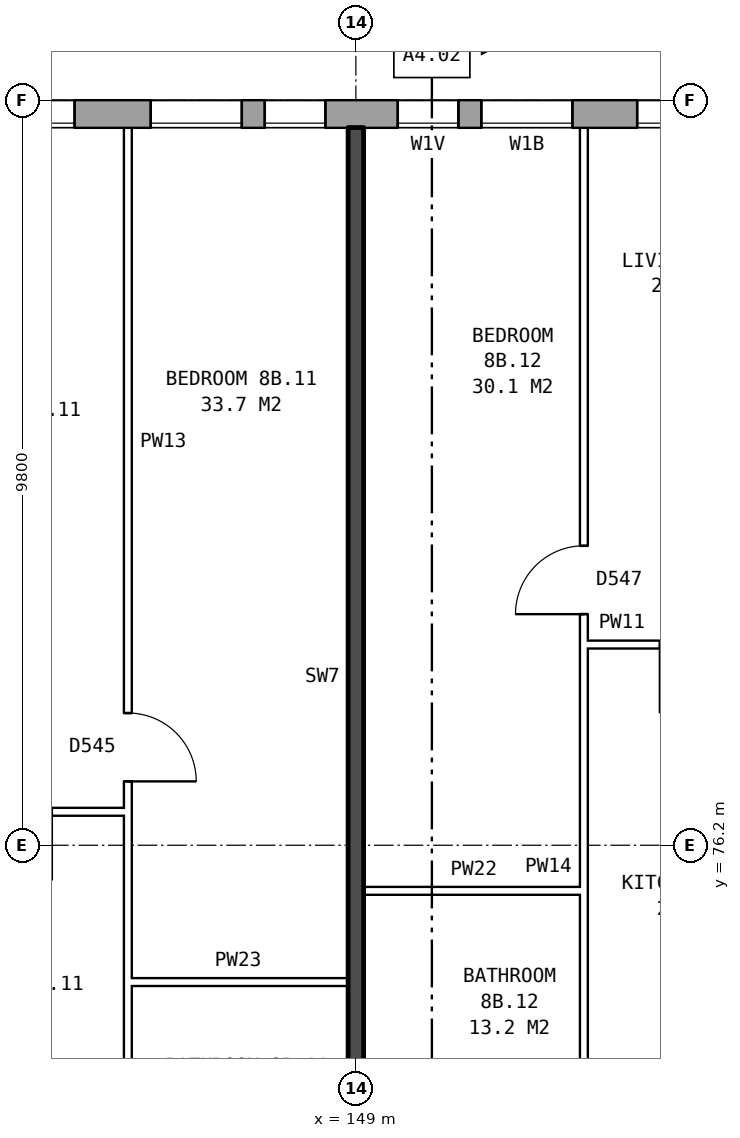
"""IFC4 building model, lengths in metres.
Left out: names, types, materials, properties, quantities, classifications, styles, units other than length and angle.
Written with IfcOpenShell. Run it as: python <this file> out.ifc"""

import sys

from ifc_helpers import new_model, si_unit, direction, frame, frame_2d, origin, place, context, subcontext, project, spatial, rectangle, extrude, element, fill, save


model = new_model("IFC4")
c1 = context("Model", 3, precision=1e-05, world=origin(), true_north=direction((0.0, 1.0)))
c2 = subcontext(c1, "Body", "Model", "MODEL_VIEW")
j1 = project(units=[si_unit("LENGTHUNIT", "METRE"), si_unit("PLANEANGLEUNIT", "RADIAN")], contexts=[c1])
p1 = place(None, origin())
s1 = spatial("IfcSite", under=j1, at=p1, CompositionType="ELEMENT")
p2 = place(p1, origin())
s2 = spatial("IfcBuilding", under=s1, at=p2, CompositionType="ELEMENT")
p3 = place(p2, frame((0.0, 0.0, 31.9)))
s3 = spatial("IfcBuildingStorey", under=s2, at=p3, CompositionType="ELEMENT", Elevation=31.9)
p4 = place(p3, frame((174.675, 85.82, 0.0), z_axis=(0.0, 0.0, 1.0), x_axis=(-1.0, 0.0, 0.0)))
e1 = element("IfcWall", 1, at=p4, inside=s3, PredefinedType="STANDARD", context=c2, shape_type="SweptSolid", body=[
    extrude(rectangle(XDim=40.601, YDim=0.36, at=frame_2d((20.3, 0.0))), origin(), (0.0, 0.0, 1.0), 2.85),
])
p5 = place(p4, frame((2.375, 0.0, 0.8)))
e2 = element("IfcOpeningElement", 2, at=p5, cuts=e1, PredefinedType="OPENING", context=c2, shape_type="SweptSolid", body=[
    extrude(rectangle(XDim=1.6, YDim=1.8, at=frame_2d((0.8, 0.9))), frame((0.0, 0.19, 0.0), z_axis=(0.0, -1.0, 0.0), x_axis=(1.0, 0.0, 0.0)), (0.0, 0.0, 1.0), 0.38),
])
p6 = place(p4, frame((5.375, 0.0, 0.8)))
e3 = element("IfcOpeningElement", 3, at=p6, cuts=e1, PredefinedType="OPENING", context=c2, shape_type="SweptSolid", body=[
    extrude(rectangle(XDim=1.6, YDim=1.8, at=frame_2d((0.8, 0.9))), frame((0.0, 0.19, 0.0), z_axis=(0.0, -1.0, 0.0), x_axis=(1.0, 0.0, 0.0)), (0.0, 0.0, 1.0), 0.38),
])
p7 = place(p4, frame((8.375, 0.0, 0.8)))
e4 = element("IfcOpeningElement", 4, at=p7, cuts=e1, PredefinedType="OPENING", context=c2, shape_type="SweptSolid", body=[
    extrude(rectangle(XDim=1.6, YDim=1.8, at=frame_2d((0.8, 0.9))), frame((0.0, 0.19, 0.0), z_axis=(0.0, -1.0, 0.0), x_axis=(1.0, 0.0, 0.0)), (0.0, 0.0, 1.0), 0.38),
])
p8 = place(p4, frame((11.375, 0.0, 0.8)))
e5 = element("IfcOpeningElement", 5, at=p8, cuts=e1, PredefinedType="OPENING", context=c2, shape_type="SweptSolid", body=[
    extrude(rectangle(XDim=1.6, YDim=1.8, at=frame_2d((0.8, 0.9))), frame((0.0, 0.19, 0.0), z_axis=(0.0, -1.0, 0.0), x_axis=(1.0, 0.0, 0.0)), (0.0, 0.0, 1.0), 0.38),
])
p9 = place(p4, frame((13.875, 0.0, 1.7)))
e6 = element("IfcOpeningElement", 6, at=p9, cuts=e1, PredefinedType="OPENING", context=c2, shape_type="SweptSolid", body=[
    extrude(rectangle(XDim=0.6, YDim=0.9, at=frame_2d((0.3, 0.45))), frame((0.0, 0.19, 0.0), z_axis=(0.0, -1.0, 0.0), x_axis=(1.0, 0.0, 0.0)), (0.0, 0.0, 1.0), 0.38),
])
p10 = place(p4, frame((17.375, 0.0, 0.8)))
e7 = element("IfcOpeningElement", 7, at=p10, cuts=e1, PredefinedType="OPENING", context=c2, shape_type="SweptSolid", body=[
    extrude(rectangle(XDim=1.6, YDim=1.8, at=frame_2d((0.8, 0.9))), frame((0.0, 0.19, 0.0), z_axis=(0.0, -1.0, 0.0), x_axis=(1.0, 0.0, 0.0)), (0.0, 0.0, 1.0), 0.38),
])
p11 = place(p4, frame((20.375, 0.0, 0.8)))
e8 = element("IfcOpeningElement", 8, at=p11, cuts=e1, PredefinedType="OPENING", context=c2, shape_type="SweptSolid", body=[
    extrude(rectangle(XDim=1.6, YDim=1.8, at=frame_2d((0.8, 0.9))), frame((0.0, 0.19, 0.0), z_axis=(0.0, -1.0, 0.0), x_axis=(1.0, 0.0, 0.0)), (0.0, 0.0, 1.0), 0.38),
])
p12 = place(p4, frame((22.825, 0.0, 0.55)))
e9 = element("IfcOpeningElement", 9, at=p12, cuts=e1, PredefinedType="OPENING", context=c2, shape_type="SweptSolid", body=[
    extrude(rectangle(XDim=1.2, YDim=1.8, at=frame_2d((0.6, 0.9))), frame((0.0, 0.19, 0.0), z_axis=(0.0, -1.0, 0.0), x_axis=(1.0, 0.0, 0.0)), (0.0, 0.0, 1.0), 0.38),
])
p13 = place(p4, frame((26.075, 0.0, 1.7)))
e10 = element("IfcOpeningElement", 10, at=p13, cuts=e1, PredefinedType="OPENING", context=c2, shape_type="SweptSolid", body=[
    extrude(rectangle(XDim=0.8, YDim=0.9, at=frame_2d((0.4, 0.45))), frame((0.0, 0.19, 0.0), z_axis=(0.0, -1.0, 0.0), x_axis=(1.0, 0.0, 0.0)), (0.0, 0.0, 1.0), 0.38),
])
p14 = place(p4, frame((29.375, 0.0, 0.8)))
e11 = element("IfcOpeningElement", 11, at=p14, cuts=e1, PredefinedType="OPENING", context=c2, shape_type="SweptSolid", body=[
    extrude(rectangle(XDim=1.6, YDim=1.8, at=frame_2d((0.8, 0.9))), frame((0.0, 0.19, 0.0), z_axis=(0.0, -1.0, 0.0), x_axis=(1.0, 0.0, 0.0)), (0.0, 0.0, 1.0), 0.38),
])
p15 = place(p4, frame((32.375, 0.0, 0.8)))
e12 = element("IfcOpeningElement", 12, at=p15, cuts=e1, PredefinedType="OPENING", context=c2, shape_type="SweptSolid", body=[
    extrude(rectangle(XDim=1.6, YDim=1.8, at=frame_2d((0.8, 0.9))), frame((0.0, 0.19, 0.0), z_axis=(0.0, -1.0, 0.0), x_axis=(1.0, 0.0, 0.0)), (0.0, 0.0, 1.0), 0.38),
])
p16 = place(p4, frame((35.375, 0.0, 0.8)))
e13 = element("IfcOpeningElement", 13, at=p16, cuts=e1, PredefinedType="OPENING", context=c2, shape_type="SweptSolid", body=[
    extrude(rectangle(XDim=1.6, YDim=1.8, at=frame_2d((0.8, 0.9))), frame((0.0, 0.19, 0.0), z_axis=(0.0, -1.0, 0.0), x_axis=(1.0, 0.0, 0.0)), (0.0, 0.0, 1.0), 0.38),
])
p17 = place(p4, frame((38.375, 0.0, 0.8)))
e14 = element("IfcOpeningElement", 14, at=p17, cuts=e1, PredefinedType="OPENING", context=c2, shape_type="SweptSolid", body=[
    extrude(rectangle(XDim=1.6, YDim=1.8, at=frame_2d((0.8, 0.9))), frame((0.0, 0.19, 0.0), z_axis=(0.0, -1.0, 0.0), x_axis=(1.0, 0.0, 0.0)), (0.0, 0.0, 1.0), 0.38),
])
p18 = place(p4, frame((15.775, 0.0, 0.8)))
e15 = element("IfcOpeningElement", 15, at=p18, cuts=e1, PredefinedType="OPENING", context=c2, shape_type="SweptSolid", body=[
    extrude(rectangle(XDim=1.2, YDim=0.9, at=frame_2d((0.6, 0.45))), frame((0.0, 0.19, 0.0), z_axis=(0.0, -1.0, 0.0), x_axis=(1.0, 0.0, 0.0)), (0.0, 0.0, 1.0), 0.38),
])
p19 = place(p4, frame((24.325, 0.0, 0.55)))
e16 = element("IfcOpeningElement", 16, at=p19, cuts=e1, PredefinedType="OPENING", context=c2, shape_type="SweptSolid", body=[
    extrude(rectangle(XDim=0.8, YDim=0.9, at=frame_2d((0.4, 0.45))), frame((0.0, 0.19, 0.0), z_axis=(0.0, -1.0, 0.0), x_axis=(1.0, 0.0, 0.0)), (0.0, 0.0, 1.0), 0.38),
])
p20 = place(p4, frame((27.175, 0.0, 0.8)))
e17 = element("IfcOpeningElement", 17, at=p20, cuts=e1, PredefinedType="OPENING", context=c2, shape_type="SweptSolid", body=[
    extrude(rectangle(XDim=1.2, YDim=1.8, at=frame_2d((0.6, 0.9))), frame((0.0, 0.19, 0.0), z_axis=(0.0, -1.0, 0.0), x_axis=(1.0, 0.0, 0.0)), (0.0, 0.0, 1.0), 0.38),
])
for number, where, z_axis, x_axis in (
    (18, (146.0, 74.4, 0.0), (0.0, 0.0, 1.0), (1.0, 0.0, 0.0)),
    (19, (149.1, 75.6, 0.0), (0.0, 0.0, 1.0), (1.0, 0.0, 0.0)),
):
    element("IfcWall", number, at=place(p3, frame(where, z_axis=z_axis, x_axis=x_axis)), inside=s3, PredefinedType="PARTITIONING", context=c2, shape_type="SweptSolid", body=[
        extrude(rectangle(XDim=2.9, YDim=0.1, at=frame_2d((1.45, 0.0))), origin(), (0.0, 0.0, 1.0), 2.85),
    ])
p21 = place(p3, frame((143.1, 76.64, 0.0), z_axis=(0.0, 0.0, 1.0), x_axis=(1.0, 0.0, 0.0)))
e20 = element("IfcWall", 20, at=p21, inside=s3, PredefinedType="PARTITIONING", context=c2, shape_type="SweptSolid", body=[
    extrude(rectangle(XDim=2.9, YDim=0.1, at=frame_2d((1.45, 0.0))), origin(), (0.0, 0.0, 1.0), 2.85),
])
p22 = place(p21, frame((1.0, 0.0, 0.0)))
e21 = element("IfcOpeningElement", 21, at=p22, cuts=e20, PredefinedType="OPENING", context=c2, shape_type="SweptSolid", body=[
    extrude(rectangle(XDim=0.9, YDim=2.1, at=frame_2d((0.45, 1.05))), frame((0.0, 0.06, 0.0), z_axis=(0.0, -1.0, 0.0), x_axis=(1.0, 0.0, 0.0)), (0.0, 0.0, 1.0), 0.12),
])
p23 = place(p3, frame((152.0, 78.84, 0.0), z_axis=(0.0, 0.0, 1.0), x_axis=(1.0, 0.0, 0.0)))
e22 = element("IfcWall", 22, at=p23, inside=s3, PredefinedType="PARTITIONING", context=c2, shape_type="SweptSolid", body=[
    extrude(rectangle(XDim=2.9, YDim=0.1, at=frame_2d((1.45, 0.0))), origin(), (0.0, 0.0, 1.0), 2.85),
])
p24 = place(p23, frame((1.0, 0.0, 0.0)))
e23 = element("IfcOpeningElement", 23, at=p24, cuts=e22, PredefinedType="OPENING", context=c2, shape_type="SweptSolid", body=[
    extrude(rectangle(XDim=0.9, YDim=2.1, at=frame_2d((0.45, 1.05))), frame((0.0, 0.06, 0.0), z_axis=(0.0, -1.0, 0.0), x_axis=(1.0, 0.0, 0.0)), (0.0, 0.0, 1.0), 0.12),
])
p25 = place(p3, frame((146.0, 71.3, 0.0), z_axis=(0.0, 0.0, 1.0), x_axis=(0.0, 1.0, 0.0)))
e24 = element("IfcWall", 24, at=p25, inside=s3, PredefinedType="PARTITIONING", context=c2, shape_type="SweptSolid", body=[
    extrude(rectangle(XDim=14.34, YDim=0.1, at=frame_2d((7.17, 0.0))), origin(), (0.0, 0.0, 1.0), 2.85),
])
p26 = place(p25, frame((5.74, 0.0, 0.0)))
e25 = element("IfcOpeningElement", 25, at=p26, cuts=e24, PredefinedType="OPENING", context=c2, shape_type="SweptSolid", body=[
    extrude(rectangle(XDim=0.9, YDim=2.1, at=frame_2d((0.45, 1.05))), frame((0.0, 0.06, 0.0), z_axis=(0.0, -1.0, 0.0), x_axis=(1.0, 0.0, 0.0)), (0.0, 0.0, 1.0), 0.12),
])
p27 = place(p25, frame((0.4, 0.0, 0.0)))
e26 = element("IfcOpeningElement", 26, at=p27, cuts=e24, PredefinedType="OPENING", context=c2, shape_type="SweptSolid", body=[
    extrude(rectangle(XDim=0.9, YDim=2.1, at=frame_2d((0.45, 1.05))), frame((0.0, 0.06, 0.0), z_axis=(0.0, -1.0, 0.0), x_axis=(1.0, 0.0, 0.0)), (0.0, 0.0, 1.0), 0.12),
])
p28 = place(p3, frame((149.0, 71.2, 0.0), z_axis=(0.0, 0.0, 1.0), x_axis=(0.0, 1.0, 0.0)))
e27 = element("IfcWall", 27, at=p28, inside=s3, PredefinedType="SOLIDWALL", context=c2, shape_type="SweptSolid", body=[
    extrude(rectangle(XDim=14.44, YDim=0.2, at=frame_2d((7.22, 0.0))), origin(), (0.0, 0.0, 1.0), 2.85),
])
p29 = place(p3, frame((152.0, 71.3, 0.0), z_axis=(0.0, 0.0, 1.0), x_axis=(0.0, 1.0, 0.0)))
e28 = element("IfcWall", 28, at=p29, inside=s3, PredefinedType="PARTITIONING", context=c2, shape_type="SweptSolid", body=[
    extrude(rectangle(XDim=14.34, YDim=0.1, at=frame_2d((7.17, 0.0))), origin(), (0.0, 0.0, 1.0), 2.85),
])
p30 = place(p29, frame((7.94, 0.0, 0.0)))
e29 = element("IfcOpeningElement", 29, at=p30, cuts=e28, PredefinedType="OPENING", context=c2, shape_type="SweptSolid", body=[
    extrude(rectangle(XDim=0.9, YDim=2.1, at=frame_2d((0.45, 1.05))), frame((0.0, 0.06, 0.0), z_axis=(0.0, -1.0, 0.0), x_axis=(1.0, 0.0, 0.0)), (0.0, 0.0, 1.0), 0.12),
])
p31 = place(p29, frame((0.4, 0.0, 0.0)))
e30 = element("IfcOpeningElement", 30, at=p31, cuts=e28, PredefinedType="OPENING", context=c2, shape_type="SweptSolid", body=[
    extrude(rectangle(XDim=0.9, YDim=2.1, at=frame_2d((0.45, 1.05))), frame((0.0, 0.06, 0.0), z_axis=(0.0, -1.0, 0.0), x_axis=(1.0, 0.0, 0.0)), (0.0, 0.0, 1.0), 0.12),
])
p32 = place(p11, origin())
e31 = element("IfcWindow", 31, at=p32, inside=s3, PartitioningType="SINGLE_PANEL", PredefinedType="WINDOW", context=c2, shape_type="SweptSolid", body=[
    extrude(rectangle(XDim=1.6, YDim=1.8, at=frame_2d((0.8, 0.9))), frame((0.0, 0.15, 0.0), z_axis=(0.0, -1.0, 0.0), x_axis=(1.0, 0.0, 0.0)), (0.0, 0.0, 1.0), 0.06),
])
fill(e8, e31)
p33 = place(p12, origin())
e32 = element("IfcWindow", 32, at=p33, inside=s3, PartitioningType="SINGLE_PANEL", PredefinedType="WINDOW", context=c2, shape_type="SweptSolid", body=[
    extrude(rectangle(XDim=1.2, YDim=1.8, at=frame_2d((0.6, 0.9))), frame((0.0, 0.15, 0.0), z_axis=(0.0, -1.0, 0.0), x_axis=(1.0, 0.0, 0.0)), (0.0, 0.0, 1.0), 0.06),
])
fill(e9, e32)
p34 = place(p13, origin())
e33 = element("IfcWindow", 33, at=p34, inside=s3, PartitioningType="SINGLE_PANEL", PredefinedType="WINDOW", context=c2, shape_type="SweptSolid", body=[
    extrude(rectangle(XDim=0.8, YDim=0.9, at=frame_2d((0.4, 0.45))), frame((0.0, 0.15, 0.0), z_axis=(0.0, -1.0, 0.0), x_axis=(1.0, 0.0, 0.0)), (0.0, 0.0, 1.0), 0.06),
])
fill(e10, e33)
p35 = place(p14, origin())
e34 = element("IfcWindow", 34, at=p35, inside=s3, PartitioningType="SINGLE_PANEL", PredefinedType="WINDOW", context=c2, shape_type="SweptSolid", body=[
    extrude(rectangle(XDim=1.6, YDim=1.8, at=frame_2d((0.8, 0.9))), frame((0.0, 0.15, 0.0), z_axis=(0.0, -1.0, 0.0), x_axis=(1.0, 0.0, 0.0)), (0.0, 0.0, 1.0), 0.06),
])
fill(e11, e34)
p36 = place(p26, frame((0.9, 0.0, 0.0), z_axis=(0.0, 0.0, 1.0), x_axis=(-1.0, 0.0, 0.0)))
e35 = element("IfcDoor", 35, at=p36, inside=s3, OperationType="SINGLE_SWING_RIGHT", PredefinedType="DOOR", context=c2, shape_type="SweptSolid", body=[
    extrude(rectangle(XDim=0.9, YDim=2.1, at=frame_2d((0.45, 1.05))), frame((0.0, 0.025, 0.0), z_axis=(0.0, -1.0, 0.0), x_axis=(1.0, 0.0, 0.0)), (0.0, 0.0, 1.0), 0.05),
])
fill(e25, e35)
p37 = place(p30, origin())
e36 = element("IfcDoor", 36, at=p37, inside=s3, OperationType="SINGLE_SWING_LEFT", PredefinedType="DOOR", context=c2, shape_type="SweptSolid", body=[
    extrude(rectangle(XDim=0.9, YDim=2.1, at=frame_2d((0.45, 1.05))), frame((0.0, 0.025, 0.0), z_axis=(0.0, -1.0, 0.0), x_axis=(1.0, 0.0, 0.0)), (0.0, 0.0, 1.0), 0.05),
])
fill(e29, e36)
p38 = place(p19, origin())
e37 = element("IfcWindow", 37, at=p38, inside=s3, PartitioningType="SINGLE_PANEL", PredefinedType="WINDOW", context=c2, shape_type="SweptSolid", body=[
    extrude(rectangle(XDim=0.8, YDim=0.9, at=frame_2d((0.4, 0.45))), frame((0.0, 0.15, 0.0), z_axis=(0.0, -1.0, 0.0), x_axis=(1.0, 0.0, 0.0)), (0.0, 0.0, 1.0), 0.06),
])
fill(e16, e37)
p39 = place(p20, origin())
e38 = element("IfcWindow", 38, at=p39, inside=s3, PartitioningType="SINGLE_PANEL", PredefinedType="WINDOW", context=c2, shape_type="SweptSolid", body=[
    extrude(rectangle(XDim=1.2, YDim=1.8, at=frame_2d((0.6, 0.9))), frame((0.0, 0.15, 0.0), z_axis=(0.0, -1.0, 0.0), x_axis=(1.0, 0.0, 0.0)), (0.0, 0.0, 1.0), 0.06),
])
fill(e17, e38)
save(model, sys.argv[1])
